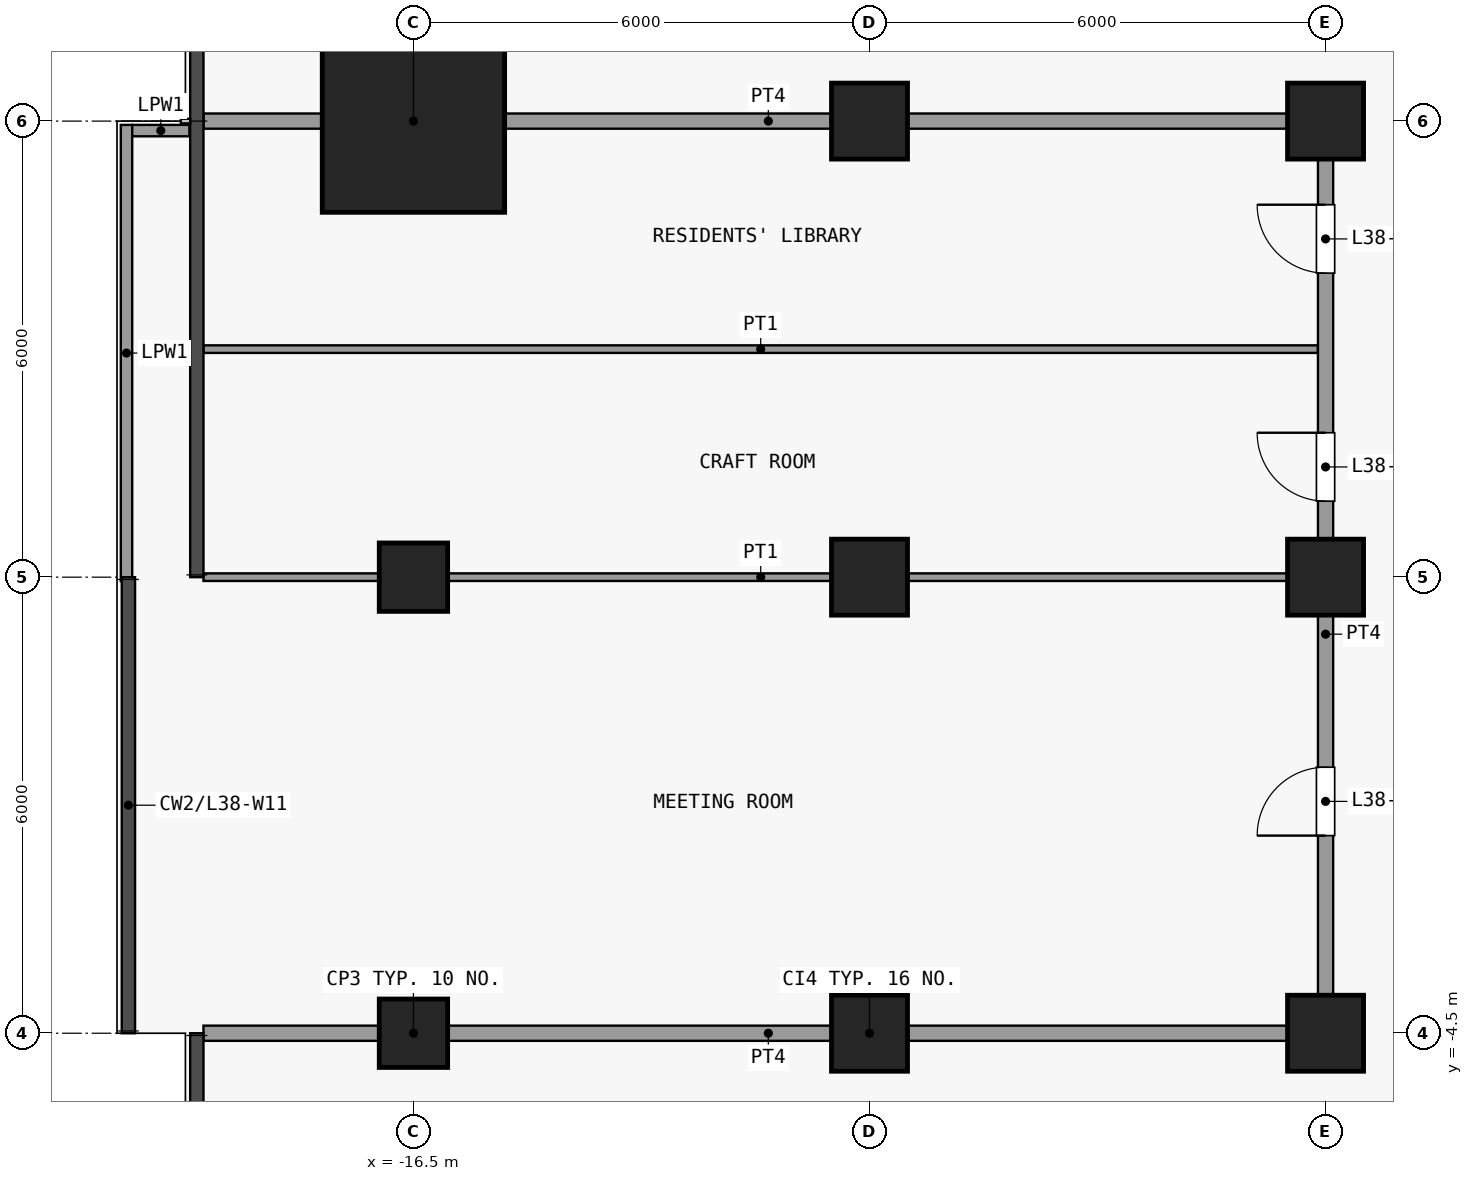
"""IFC4 building model, lengths in metres.
Left out: names, types, materials, properties, quantities, classifications, styles, units other than length and angle.
Written with IfcOpenShell. Run it as: python <this file> out.ifc"""

import sys

from ifc_helpers import new_model, si_unit, direction, frame, frame_2d, origin, origin_2d, place, context, subcontext, project, spatial, rectangle, extrude, element, fill, save


model = new_model("IFC4")
c1 = context("Model", 3, precision=1e-05, world=origin(), true_north=direction((0.0, 1.0)))
c2 = subcontext(c1, "Body", "Model", "MODEL_VIEW")
j1 = project(units=[si_unit("LENGTHUNIT", "METRE"), si_unit("PLANEANGLEUNIT", "RADIAN")], contexts=[c1])
p1 = place(None, origin())
s1 = spatial("IfcSite", under=j1, at=p1, CompositionType="ELEMENT")
p2 = place(p1, origin())
s2 = spatial("IfcBuilding", under=s1, at=p2, CompositionType="ELEMENT")
p3 = place(p2, frame((0.0, 0.0, 156.5)))
s3 = spatial("IfcBuildingStorey", under=s2, at=p3, CompositionType="ELEMENT", Elevation=156.5)
for number, where, z_axis, x_axis in (
    (1, (-16.5, -4.5, 0.0), (0.0, 0.0, 1.0), (1.0, 0.0, 0.0)),
    (2, (-16.5, 1.5, 0.0), (0.0, 0.0, 1.0), (1.0, 0.0, 0.0)),
):
    element("IfcColumn", number, at=place(p3, frame(where, z_axis=z_axis, x_axis=x_axis)), inside=s3, PredefinedType="COLUMN", context=c2, shape_type="SweptSolid", body=[
        extrude(rectangle(XDim=0.9, YDim=0.9, at=origin_2d()), origin(), (0.0, 0.0, 1.0), 3.6),
    ])
p4 = place(p3, frame((-16.5, 7.5, 0.0), z_axis=(0.0, 0.0, 1.0), x_axis=(1.0, 0.0, 0.0)))
e3 = element("IfcColumn", 3, at=p4, inside=s3, PredefinedType="COLUMN", context=c2, shape_type="SweptSolid", body=[
    extrude(rectangle(XDim=2.4, YDim=2.4, at=origin_2d()), origin(), (0.0, 0.0, 1.0), 3.6),
])
for number, where, z_axis, x_axis in (
    (4, (-10.5, -4.5, 0.0), (0.0, 0.0, 1.0), (1.0, 0.0, 0.0)),
    (5, (-10.5, 1.5, 0.0), (0.0, 0.0, 1.0), (1.0, 0.0, 0.0)),
    (6, (-10.5, 7.5, 0.0), (0.0, 0.0, 1.0), (1.0, 0.0, 0.0)),
    (7, (-4.5, -4.5, 0.0), (0.0, 0.0, 1.0), (1.0, 0.0, 0.0)),
    (8, (-4.5, 1.5, 0.0), (0.0, 0.0, 1.0), (1.0, 0.0, 0.0)),
    (9, (-4.5, 7.5, 0.0), (0.0, 0.0, 1.0), (1.0, 0.0, 0.0)),
):
    element("IfcColumn", number, at=place(p3, frame(where, z_axis=z_axis, x_axis=x_axis)), inside=s3, PredefinedType="COLUMN", context=c2, shape_type="SweptSolid", body=[
        extrude(rectangle(XDim=1.0, YDim=1.0, at=origin_2d()), origin(), (0.0, 0.0, 1.0), 3.6),
    ])
p5 = place(p3, frame((-20.275, 1.448, 0.0), z_axis=(0.0, 0.0, 1.0), x_axis=(0.0, 1.0, 0.0)))
e10 = element("IfcWall", 10, at=p5, inside=s3, PredefinedType="PARAPET", context=c2, shape_type="SweptSolid", body=[
    extrude(rectangle(XDim=6.002, YDim=0.15, at=frame_2d((3.001, 0.0))), origin(), (0.0, 0.0, 1.0), 1.15),
])
p6 = place(p3, frame((-20.2, 7.375, 0.0), z_axis=(0.0, 0.0, 1.0), x_axis=(1.0, 0.0, 0.0)))
e11 = element("IfcWall", 11, at=p6, inside=s3, PredefinedType="PARAPET", context=c2, shape_type="SweptSolid", body=[
    extrude(rectangle(XDim=0.752, YDim=0.15, at=frame_2d((0.376, 0.0))), origin(), (0.0, 0.0, 1.0), 1.15),
])
p7 = place(p3, frame((-19.262, -4.5, 0.0), z_axis=(0.0, 0.0, 1.0), x_axis=(1.0, 0.0, 0.0)))
e12 = element("IfcWall", 12, at=p7, inside=s3, PredefinedType="PARTITIONING", context=c2, shape_type="SweptSolid", body=[
    extrude(rectangle(XDim=14.863, YDim=0.2, at=frame_2d((7.431, 0.0))), origin(), (0.0, 0.0, 1.0), 3.3),
])
for number, where, z_axis, x_axis in (
    (13, (-19.262, 1.5, 0.0), (0.0, 0.0, 1.0), (1.0, 0.0, 0.0)),
    (14, (-19.262, 4.5, 0.0), (0.0, 0.0, 1.0), (1.0, 0.0, 0.0)),
):
    element("IfcWall", number, at=place(p3, frame(where, z_axis=z_axis, x_axis=x_axis)), inside=s3, PredefinedType="PARTITIONING", context=c2, shape_type="SweptSolid", body=[
        extrude(rectangle(XDim=14.662, YDim=0.1, at=frame_2d((7.331, 0.0))), origin(), (0.0, 0.0, 1.0), 3.3),
    ])
p8 = place(p3, frame((-19.262, 7.5, 0.0), z_axis=(0.0, 0.0, 1.0), x_axis=(1.0, 0.0, 0.0)))
e15 = element("IfcWall", 15, at=p8, inside=s3, PredefinedType="PARTITIONING", context=c2, shape_type="SweptSolid", body=[
    extrude(rectangle(XDim=14.863, YDim=0.2, at=frame_2d((7.431, 0.0))), origin(), (0.0, 0.0, 1.0), 3.3),
])
p9 = place(p3, frame((-4.5, -4.4, 0.0), z_axis=(0.0, 0.0, 1.0), x_axis=(0.0, 1.0, 0.0)))
e16 = element("IfcWall", 16, at=p9, inside=s3, PredefinedType="PARTITIONING", context=c2, shape_type="SweptSolid", body=[
    extrude(rectangle(XDim=11.8, YDim=0.2, at=frame_2d((5.9, 0.0))), origin(), (0.0, 0.0, 1.0), 3.3),
])
p10 = place(p9, frame((2.5, 0.0, 0.0)))
e17 = element("IfcOpeningElement", 17, at=p10, cuts=e16, PredefinedType="OPENING", context=c2, shape_type="SweptSolid", body=[
    extrude(rectangle(XDim=0.9, YDim=2.1, at=frame_2d((0.45, 1.05))), frame((0.0, 0.11, 0.0), z_axis=(0.0, -1.0, 0.0), x_axis=(1.0, 0.0, 0.0)), (0.0, 0.0, 1.0), 0.22),
])
p11 = place(p9, frame((6.9, 0.0, 0.0)))
e18 = element("IfcOpeningElement", 18, at=p11, cuts=e16, PredefinedType="OPENING", context=c2, shape_type="SweptSolid", body=[
    extrude(rectangle(XDim=0.9, YDim=2.1, at=frame_2d((0.45, 1.05))), frame((0.0, 0.11, 0.0), z_axis=(0.0, -1.0, 0.0), x_axis=(1.0, 0.0, 0.0)), (0.0, 0.0, 1.0), 0.22),
])
p12 = place(p9, frame((9.9, 0.0, 0.0)))
e19 = element("IfcOpeningElement", 19, at=p12, cuts=e16, PredefinedType="OPENING", context=c2, shape_type="SweptSolid", body=[
    extrude(rectangle(XDim=0.9, YDim=2.1, at=frame_2d((0.45, 1.05))), frame((0.0, 0.11, 0.0), z_axis=(0.0, -1.0, 0.0), x_axis=(1.0, 0.0, 0.0)), (0.0, 0.0, 1.0), 0.22),
])
p13 = place(p10, origin())
e20 = element("IfcDoor", 20, at=p13, inside=s3, OperationType="SINGLE_SWING_RIGHT", PredefinedType="DOOR", context=c2, shape_type="SweptSolid", body=[
    extrude(rectangle(XDim=0.9, YDim=2.1, at=frame_2d((0.45, 1.05))), frame((0.0, 0.025, 0.0), z_axis=(0.0, -1.0, 0.0), x_axis=(1.0, 0.0, 0.0)), (0.0, 0.0, 1.0), 0.05),
])
fill(e17, e20)
p14 = place(p11, origin())
e21 = element("IfcDoor", 21, at=p14, inside=s3, OperationType="SINGLE_SWING_LEFT", PredefinedType="DOOR", context=c2, shape_type="SweptSolid", body=[
    extrude(rectangle(XDim=0.9, YDim=2.1, at=frame_2d((0.45, 1.05))), frame((0.0, 0.025, 0.0), z_axis=(0.0, -1.0, 0.0), x_axis=(1.0, 0.0, 0.0)), (0.0, 0.0, 1.0), 0.05),
])
fill(e18, e21)
p15 = place(p12, origin())
e22 = element("IfcDoor", 22, at=p15, inside=s3, OperationType="SINGLE_SWING_LEFT", PredefinedType="DOOR", context=c2, shape_type="SweptSolid", body=[
    extrude(rectangle(XDim=0.9, YDim=2.1, at=frame_2d((0.45, 1.05))), frame((0.0, 0.025, 0.0), z_axis=(0.0, -1.0, 0.0), x_axis=(1.0, 0.0, 0.0)), (0.0, 0.0, 1.0), 0.05),
])
fill(e19, e22)
save(model, sys.argv[1])
